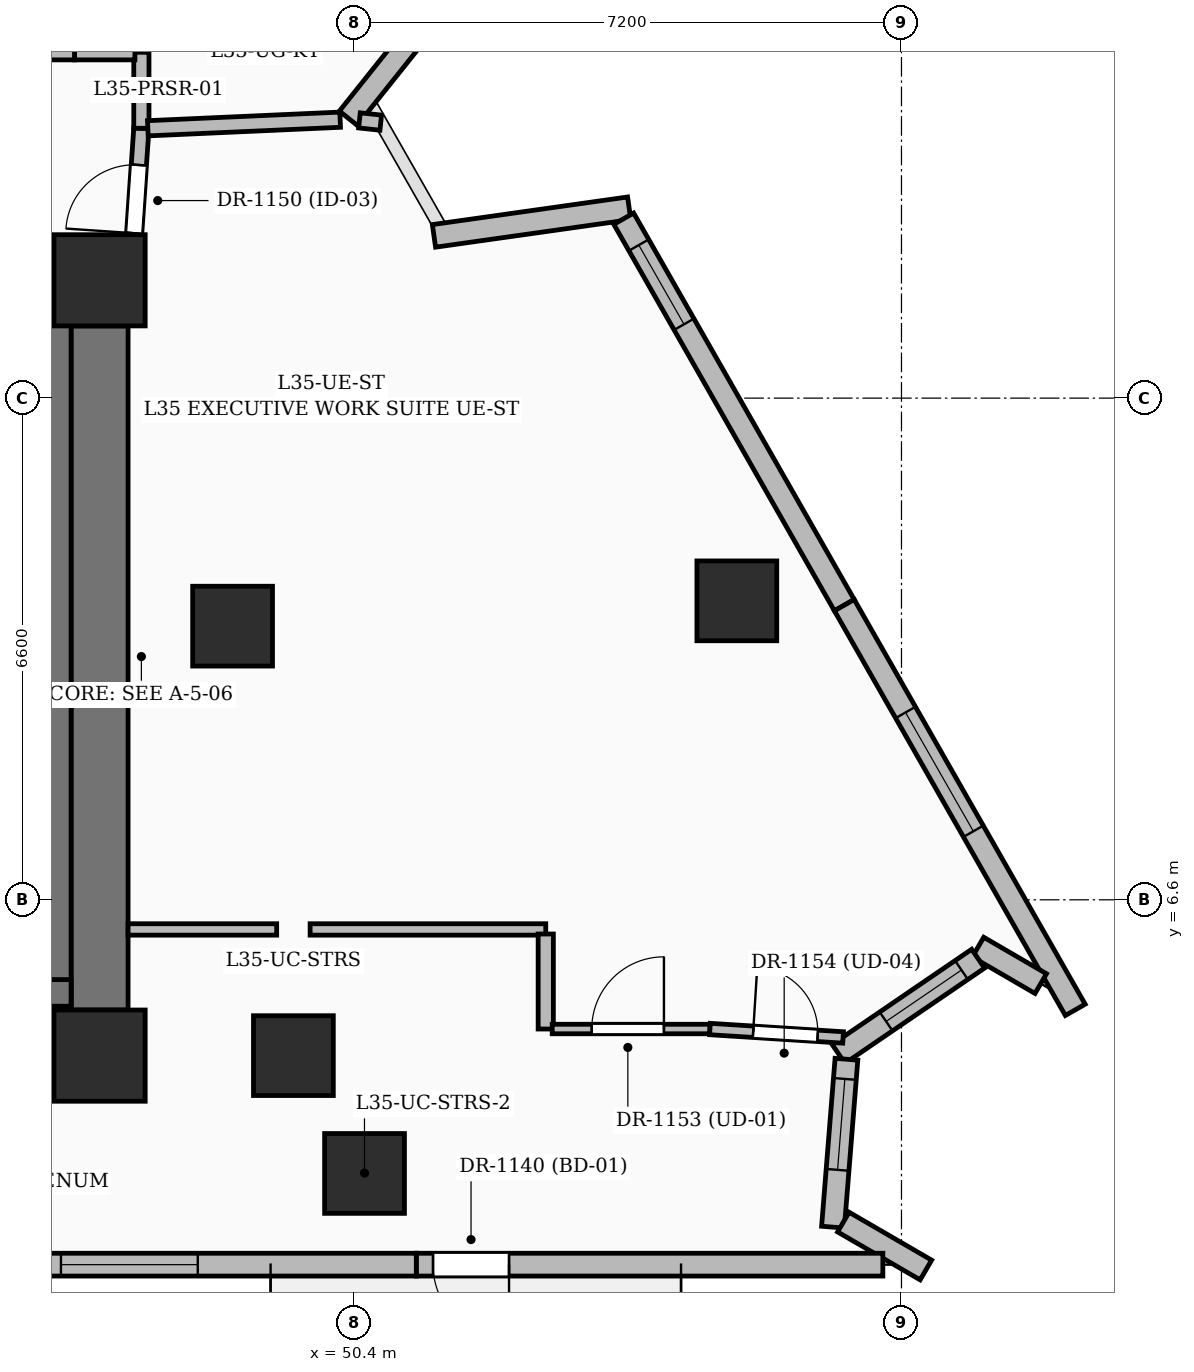
"""IFC4 building model, lengths in metres.
Left out: names, types, materials, properties, quantities, classifications, styles, units other than length and angle.
Written with IfcOpenShell. Run it as: python <this file> out.ifc"""

import sys

from ifc_helpers import new_model, si_unit, direction, frame, frame_2d, origin, origin_2d, place, context, subcontext, project, spatial, rectangle, extrude, element, fill, save


model = new_model("IFC4")
c1 = context("Model", 3, precision=1e-05, world=origin(), true_north=direction((0.0, 1.0)))
c2 = subcontext(c1, "Body", "Model", "MODEL_VIEW")
j1 = project(units=[si_unit("LENGTHUNIT", "METRE"), si_unit("PLANEANGLEUNIT", "RADIAN")], contexts=[c1])
p1 = place(None, origin())
s1 = spatial("IfcSite", under=j1, at=p1, CompositionType="ELEMENT")
p2 = place(p1, origin())
s2 = spatial("IfcBuilding", under=s1, at=p2, CompositionType="ELEMENT")
p3 = place(p2, frame((0.0, 0.0, 139.2)))
s3 = spatial("IfcBuildingStorey", under=s2, at=p3, CompositionType="ELEMENT", Elevation=139.2)
for number, where, z_axis, x_axis in (
    (1, (47.05, 4.55, 0.0), (0.0, 0.0, 1.0), (1.0, 0.0, 0.0)),
    (2, (47.05, 14.75, 0.0), (0.0, 0.0, 1.0), (1.0, 0.0, 0.0)),
):
    element("IfcColumn", number, at=place(p3, frame(where, z_axis=z_axis, x_axis=x_axis)), inside=s3, PredefinedType="COLUMN", context=c2, shape_type="SweptSolid", body=[
        extrude(rectangle(XDim=1.2, YDim=1.2, at=origin_2d()), origin(), (0.0, 0.0, 1.0), 3.6),
    ])
for number, where, z_axis, x_axis in (
    (3, (49.6, 4.55, 0.0), (0.0, 0.0, 1.0), (1.0, 0.0, 0.0)),
    (4, (48.8, 10.2, 0.0), (0.0, 0.0, 1.0), (1.0, 0.0, 0.0)),
):
    element("IfcColumn", number, at=place(p3, frame(where, z_axis=z_axis, x_axis=x_axis)), inside=s3, PredefinedType="COLUMN", context=c2, shape_type="SweptSolid", body=[
        extrude(rectangle(XDim=1.05, YDim=1.05, at=origin_2d()), origin(), (0.0, 0.0, 1.0), 3.6),
    ])
p4 = place(p3, frame((35.75, 4.55, 0.0), z_axis=(0.0, 0.0, 1.0), x_axis=(1.0, 0.0, 0.0)))
e5 = element("IfcWall", 5, at=p4, inside=s3, PredefinedType="SHEAR", context=c2, shape_type="SweptSolid", body=[
    extrude(rectangle(XDim=10.7, YDim=0.75, at=frame_2d((5.35, 0.0))), origin(), (0.0, 0.0, 1.0), 3.6),
])
p5 = place(p3, frame((35.75, 14.75, 0.0), z_axis=(0.0, 0.0, 1.0), x_axis=(1.0, 0.0, 0.0)))
e6 = element("IfcWall", 6, at=p5, inside=s3, PredefinedType="SHEAR", context=c2, shape_type="SweptSolid", body=[
    extrude(rectangle(XDim=10.7, YDim=0.75, at=frame_2d((5.35, 0.0))), origin(), (0.0, 0.0, 1.0), 3.6),
])
p6 = place(p5, frame((1.025, 0.0, 0.0)))
e7 = element("IfcOpeningElement", 7, at=p6, cuts=e6, PredefinedType="OPENING", context=c2, shape_type="SweptSolid", body=[
    extrude(rectangle(XDim=1.05, YDim=2.15, at=frame_2d((0.525, 1.075))), frame((0.0, 0.385, 0.0), z_axis=(0.0, -1.0, 0.0), x_axis=(1.0, 0.0, 0.0)), (0.0, 0.0, 1.0), 0.77),
])
p7 = place(p5, frame((8.625, 0.0, 0.0)))
e8 = element("IfcOpeningElement", 8, at=p7, cuts=e6, PredefinedType="OPENING", context=c2, shape_type="SweptSolid", body=[
    extrude(rectangle(XDim=1.05, YDim=2.15, at=frame_2d((0.525, 1.075))), frame((0.0, 0.385, 0.0), z_axis=(0.0, -1.0, 0.0), x_axis=(1.0, 0.0, 0.0)), (0.0, 0.0, 1.0), 0.77),
])
p8 = place(p3, frame((47.05, 5.15, 0.0), z_axis=(0.0, 0.0, 1.0), x_axis=(0.0, 1.0, 0.0)))
e9 = element("IfcWall", 9, at=p8, inside=s3, PredefinedType="SHEAR", context=c2, shape_type="SweptSolid", body=[
    extrude(rectangle(XDim=9.0, YDim=0.75, at=frame_2d((4.5, 0.0))), origin(), (0.0, 0.0, 1.0), 3.6),
])
p9 = place(p3, frame((46.5, 5.2, 0.0), z_axis=(0.0, 0.0, 1.0), x_axis=(0.0, 1.0, 0.0)))
e10 = element("IfcWall", 10, at=p9, inside=s3, PredefinedType="SOLIDWALL", context=c2, shape_type="SweptSolid", body=[
    extrude(rectangle(XDim=9.175, YDim=0.35, at=frame_2d((4.587, 0.0))), origin(), (0.0, 0.0, 1.0), 3.6),
])
p10 = place(p3, frame((43.125, 5.375, 0.0), z_axis=(0.0, 0.0, 1.0), x_axis=(1.0, 0.0, 0.0)))
e11 = element("IfcWall", 11, at=p10, inside=s3, PredefinedType="SOLIDWALL", context=c2, shape_type="SweptSolid", body=[
    extrude(rectangle(XDim=3.55, YDim=0.35, at=frame_2d((1.775, 0.0))), origin(), (0.0, 0.0, 1.0), 3.6),
])
for number, where, z_axis, x_axis in (
    (12, (50.536, 3.0, 0.0), (0.0, 0.0, 1.0), (1.0, 0.0, 0.0)),
    (13, (55.434, 10.533, 0.0), (0.0, 0.0, 1.0), (1.0, 0.0, 0.0)),
):
    element("IfcColumn", number, at=place(p3, frame(where, z_axis=z_axis, x_axis=x_axis)), inside=s3, PredefinedType="COLUMN", context=c2, shape_type="SweptSolid", body=[
        extrude(rectangle(XDim=1.05, YDim=1.05, at=origin_2d()), origin(), (0.0, 0.0, 1.0), 3.6),
    ])
p11 = place(p3, frame((51.909, 18.869, 0.0), z_axis=(0.0, 0.0, 1.0), x_axis=(-0.624062389724, -0.781374515666, 0.0)))
e14 = element("IfcWall", 14, at=p11, inside=s3, PredefinedType="SOLIDWALL", context=c2, shape_type="SweptSolid", body=[
    extrude(rectangle(XDim=2.542, YDim=0.3, at=frame_2d((1.271, 0.0))), origin(), (0.0, 0.0, 1.0), 2.575),
])
p12 = place(p3, frame((51.449, 15.334, 0.0), z_axis=(0.0, 0.0, 1.0), x_axis=(0.990155518745, 0.139971599617, 0.0)))
e15 = element("IfcWall", 15, at=p12, inside=s3, PredefinedType="SOLIDWALL", context=c2, shape_type="SweptSolid", body=[
    extrude(rectangle(XDim=2.594, YDim=0.3, at=frame_2d((1.297, 0.0))), origin(), (0.0, 0.0, 1.0), 2.575),
])
p13 = place(p3, frame((53.946, 15.561, 0.0), z_axis=(0.0, 0.0, 1.0), x_axis=(0.495694281434, -0.868497080797, 0.0)))
e16 = element("IfcWall", 16, at=p13, inside=s3, PredefinedType="SOLIDWALL", context=c2, shape_type="SweptSolid", body=[
    extrude(rectangle(XDim=5.855, YDim=0.3, at=frame_2d((2.927, 0.0))), origin(), (0.0, 0.0, 1.0), 3.35),
])
p14 = place(p13, frame((0.4, 0.0, 0.8)))
e17 = element("IfcOpeningElement", 17, at=p14, cuts=e16, PredefinedType="OPENING", context=c2, shape_type="SweptSolid", body=[
    extrude(rectangle(XDim=1.2, YDim=1.8, at=frame_2d((0.6, 0.9))), frame((0.0, 0.16, 0.0), z_axis=(0.0, -1.0, 0.0), x_axis=(1.0, 0.0, 0.0)), (0.0, 0.0, 1.0), 0.32),
])
p15 = place(p3, frame((56.848, 10.476, 0.0), z_axis=(0.0, 0.0, 1.0), x_axis=(0.495701378265, -0.868493030246, 0.0)))
e18 = element("IfcWall", 18, at=p15, inside=s3, PredefinedType="SOLIDWALL", context=c2, shape_type="SweptSolid", body=[
    extrude(rectangle(XDim=6.13, YDim=0.3, at=frame_2d((3.065, 0.0))), origin(), (0.0, 0.0, 1.0), 3.35),
])
p16 = place(p15, frame((1.625, 0.0, 0.6)))
e19 = element("IfcOpeningElement", 19, at=p16, cuts=e18, PredefinedType="OPENING", context=c2, shape_type="SweptSolid", body=[
    extrude(rectangle(XDim=1.8, YDim=2.1, at=frame_2d((0.9, 1.05))), frame((0.0, 0.16, 0.0), z_axis=(0.0, -1.0, 0.0), x_axis=(1.0, 0.0, 0.0)), (0.0, 0.0, 1.0), 0.32),
])
p17 = place(p3, frame((59.432, 5.498, 0.0), z_axis=(0.0, 0.0, 1.0), x_axis=(-0.864584698218, 0.502487113871, 0.0)))
e20 = element("IfcWall", 20, at=p17, inside=s3, PredefinedType="SOLIDWALL", context=c2, shape_type="SweptSolid", body=[
    extrude(rectangle(XDim=0.955, YDim=0.3, at=frame_2d((0.478, 0.0))), origin(), (0.0, 0.0, 1.0), 3.35),
])
p18 = place(p3, frame((58.608, 5.825, 0.0), z_axis=(0.0, 0.0, 1.0), x_axis=(-0.8261738865, -0.563415219234, 0.0)))
e21 = element("IfcWall", 21, at=p18, inside=s3, PredefinedType="SOLIDWALL", context=c2, shape_type="SweptSolid", body=[
    extrude(rectangle(XDim=2.222, YDim=0.3, at=frame_2d((1.111, 0.0))), origin(), (0.0, 0.0, 1.0), 3.35),
])
p19 = place(p18, frame((0.265, 0.0, 0.8)))
e22 = element("IfcOpeningElement", 22, at=p19, cuts=e21, PredefinedType="OPENING", context=c2, shape_type="SweptSolid", body=[
    extrude(rectangle(XDim=1.2, YDim=1.8, at=frame_2d((0.6, 0.9))), frame((0.0, 0.16, 0.0), z_axis=(0.0, -1.0, 0.0), x_axis=(1.0, 0.0, 0.0)), (0.0, 0.0, 1.0), 0.32),
])
p20 = place(p3, frame((56.876, 4.502, 0.0), z_axis=(0.0, 0.0, 1.0), x_axis=(-0.079981668757, -0.996796334595, 0.0)))
e23 = element("IfcWall", 23, at=p20, inside=s3, PredefinedType="SOLIDWALL", context=c2, shape_type="SweptSolid", body=[
    extrude(rectangle(XDim=2.216, YDim=0.3, at=frame_2d((1.108, 0.0))), origin(), (0.0, 0.0, 1.0), 3.35),
])
p21 = place(p20, frame((0.26, 0.0, 0.8)))
e24 = element("IfcOpeningElement", 24, at=p21, cuts=e23, PredefinedType="OPENING", context=c2, shape_type="SweptSolid", body=[
    extrude(rectangle(XDim=1.2, YDim=1.8, at=frame_2d((0.6, 0.9))), frame((0.0, 0.16, 0.0), z_axis=(0.0, -1.0, 0.0), x_axis=(1.0, 0.0, 0.0)), (0.0, 0.0, 1.0), 0.32),
])
p22 = place(p3, frame((56.835, 2.36, 0.0), z_axis=(0.0, 0.0, 1.0), x_axis=(0.864799842676, -0.502116751471, 0.0)))
e25 = element("IfcWall", 25, at=p22, inside=s3, PredefinedType="SOLIDWALL", context=c2, shape_type="SweptSolid", body=[
    extrude(rectangle(XDim=1.255, YDim=0.3, at=frame_2d((0.628, 0.0))), origin(), (0.0, 0.0, 1.0), 3.35),
])
p23 = place(p3, frame((57.355, 1.8, 0.0), z_axis=(0.0, 0.0, 1.0), x_axis=(-1.0, 0.0, 0.0)))
e26 = element("IfcWall", 26, at=p23, inside=s3, PredefinedType="SOLIDWALL", context=c2, shape_type="SweptSolid", body=[
    extrude(rectangle(XDim=6.138, YDim=0.3, at=frame_2d((3.069, 0.0))), origin(), (0.0, 0.0, 1.0), 3.35),
])
p24 = place(p23, frame((4.918, 0.0, 0.0)))
e27 = element("IfcOpeningElement", 27, at=p24, cuts=e26, PredefinedType="OPENING", context=c2, shape_type="SweptSolid", body=[
    extrude(rectangle(XDim=1.0, YDim=2.2, at=frame_2d((0.5, 1.1))), frame((0.0, 0.16, 0.0), z_axis=(0.0, -1.0, 0.0), x_axis=(1.0, 0.0, 0.0)), (0.0, 0.0, 1.0), 0.32),
])
p25 = place(p3, frame((51.217, 1.8, 0.0), z_axis=(0.0, 0.0, 1.0), x_axis=(-1.0, 0.0, 0.0)))
e28 = element("IfcWall", 28, at=p25, inside=s3, PredefinedType="SOLIDWALL", context=c2, shape_type="SweptSolid", body=[
    extrude(rectangle(XDim=6.723, YDim=0.3, at=frame_2d((3.362, 0.0))), origin(), (0.0, 0.0, 1.0), 3.35),
])
p26 = place(p25, frame((2.875, 0.0, 0.6)))
e29 = element("IfcOpeningElement", 29, at=p26, cuts=e28, PredefinedType="OPENING", context=c2, shape_type="SweptSolid", body=[
    extrude(rectangle(XDim=1.8, YDim=2.1, at=frame_2d((0.9, 1.05))), frame((0.0, 0.16, 0.0), z_axis=(0.0, -1.0, 0.0), x_axis=(1.0, 0.0, 0.0)), (0.0, 0.0, 1.0), 0.32),
])
p27 = place(p3, frame((47.425, 14.2, 0.0), z_axis=(0.0, 0.0, 1.0), x_axis=(0.068484119878, 0.997652206595, 0.0)))
e30 = element("IfcWall", 30, at=p27, inside=s3, PredefinedType="PARTITIONING", context=c2, shape_type="SweptSolid", body=[
    extrude(rectangle(XDim=2.556, YDim=0.2, at=frame_2d((1.278, 0.0))), origin(), (0.0, 0.0, 1.0), 2.393),
])
p28 = place(p27, frame((1.172, 0.0, 0.0)))
e31 = element("IfcOpeningElement", 31, at=p28, cuts=e30, PredefinedType="OPENING", context=c2, shape_type="SweptSolid", body=[
    extrude(rectangle(XDim=0.9, YDim=2.1, at=frame_2d((0.45, 1.05))), frame((0.0, 0.11, 0.0), z_axis=(0.0, -1.0, 0.0), x_axis=(1.0, 0.0, 0.0)), (0.0, 0.0, 1.0), 0.22),
])
p29 = place(p3, frame((47.6, 16.75, 0.0), z_axis=(0.0, 0.0, 1.0), x_axis=(0.0, 1.0, 0.0)))
e32 = element("IfcWall", 32, at=p29, inside=s3, PredefinedType="PARTITIONING", context=c2, shape_type="SweptSolid", body=[
    extrude(rectangle(XDim=1.0, YDim=0.2, at=frame_2d((0.5, 0.0))), origin(), (0.0, 0.0, 1.0), 3.35),
])
p30 = place(p3, frame((47.515, 17.75, 0.0), z_axis=(0.0, 0.0, 1.0), x_axis=(-1.0, 0.0, 0.0)))
e33 = element("IfcWall", 33, at=p30, inside=s3, PredefinedType="PARTITIONING", context=c2, shape_type="SweptSolid", body=[
    extrude(rectangle(XDim=0.795, YDim=0.2, at=frame_2d((0.397, 0.0))), origin(), (0.0, 0.0, 1.0), 3.35),
])
p31 = place(p3, frame((46.72, 17.75, 0.0), z_axis=(0.0, 0.0, 1.0), x_axis=(-1.0, 0.0, 0.0)))
e34 = element("IfcWall", 34, at=p31, inside=s3, PredefinedType="PARTITIONING", context=c2, shape_type="SweptSolid", body=[
    extrude(rectangle(XDim=2.72, YDim=0.2, at=frame_2d((1.36, 0.0))), origin(), (0.0, 0.0, 1.0), 2.436),
])
p32 = place(p3, frame((49.38, 6.21, 0.0), z_axis=(0.0, 0.0, 1.0), x_axis=(-1.0, 0.0, 0.0)))
e35 = element("IfcWall", 35, at=p32, inside=s3, PredefinedType="PARTITIONING", context=c2, shape_type="SweptSolid", body=[
    extrude(rectangle(XDim=1.955, YDim=0.15, at=frame_2d((0.978, 0.0))), origin(), (0.0, 0.0, 1.0), 2.436),
])
p33 = place(p3, frame((52.92, 6.21, 0.0), z_axis=(0.0, 0.0, 1.0), x_axis=(-1.0, 0.0, 0.0)))
e36 = element("IfcWall", 36, at=p33, inside=s3, PredefinedType="PARTITIONING", context=c2, shape_type="SweptSolid", body=[
    extrude(rectangle(XDim=3.1, YDim=0.15, at=frame_2d((1.55, 0.0))), origin(), (0.0, 0.0, 1.0), 2.57),
])
p34 = place(p3, frame((52.92, 4.9, 0.0), z_axis=(0.0, 0.0, 1.0), x_axis=(0.0, 1.0, 0.0)))
e37 = element("IfcWall", 37, at=p34, inside=s3, PredefinedType="PARTITIONING", context=c2, shape_type="SweptSolid", body=[
    extrude(rectangle(XDim=1.25, YDim=0.2, at=frame_2d((0.625, 0.0))), origin(), (0.0, 0.0, 1.0), 2.57),
])
p35 = place(p3, frame((53.005, 4.9, 0.0), z_axis=(0.0, 0.0, 1.0), x_axis=(1.0, 0.0, 0.0)))
e38 = element("IfcWall", 38, at=p35, inside=s3, PredefinedType="PARTITIONING", context=c2, shape_type="SweptSolid", body=[
    extrude(rectangle(XDim=2.075, YDim=0.125, at=frame_2d((1.038, 0.0))), origin(), (0.0, 0.0, 1.0), 3.35),
])
p36 = place(p35, frame((0.52, 0.0, 0.0)))
e39 = element("IfcOpeningElement", 39, at=p36, cuts=e38, PredefinedType="OPENING", context=c2, shape_type="SweptSolid", body=[
    extrude(rectangle(XDim=0.95, YDim=2.2, at=frame_2d((0.475, 1.1))), frame((0.0, 0.072, 0.0), z_axis=(0.0, -1.0, 0.0), x_axis=(1.0, 0.0, 0.0)), (0.0, 0.0, 1.0), 0.145),
])
p37 = place(p3, frame((55.08, 4.9, 0.0), z_axis=(0.0, 0.0, 1.0), x_axis=(0.998004666512, -0.063140206047, 0.0)))
e40 = element("IfcWall", 40, at=p37, inside=s3, PredefinedType="PARTITIONING", context=c2, shape_type="SweptSolid", body=[
    extrude(rectangle(XDim=1.755, YDim=0.15, at=frame_2d((0.878, 0.0))), origin(), (0.0, 0.0, 1.0), 3.35),
])
p38 = place(p37, frame((0.57, 0.0, 0.0)))
e41 = element("IfcOpeningElement", 41, at=p38, cuts=e40, PredefinedType="OPENING", context=c2, shape_type="SweptSolid", body=[
    extrude(rectangle(XDim=0.85, YDim=2.1, at=frame_2d((0.425, 1.05))), frame((0.0, 0.085, 0.0), z_axis=(0.0, -1.0, 0.0), x_axis=(1.0, 0.0, 0.0)), (0.0, 0.0, 1.0), 0.17),
])
p39 = place(p3, frame((50.215, 16.863, 0.0), z_axis=(0.0, 0.0, 1.0), x_axis=(-0.999003421761, -0.04463365669, 0.0)))
e42 = element("IfcWall", 42, at=p39, inside=s3, PredefinedType="PARTITIONING", context=c2, shape_type="SweptSolid", body=[
    extrude(rectangle(XDim=2.532, YDim=0.2, at=frame_2d((1.266, 0.0))), origin(), (0.0, 0.0, 1.0), 2.393),
])
p40 = place(p3, frame((50.749, 16.824, 0.0), z_axis=(0.0, 0.0, 1.0), x_axis=(-0.994299311312, 0.106624947944, 0.0)))
e43 = element("IfcWall", 43, at=p40, inside=s3, PredefinedType="PARTITIONING", context=c2, shape_type="SweptSolid", body=[
    extrude(rectangle(XDim=0.282, YDim=0.2, at=frame_2d((0.141, 0.0))), origin(), (0.0, 0.0, 1.0), 3.35),
])
p41 = place(p14, origin())
e44 = element("IfcWindow", 44, at=p41, inside=s3, PartitioningType="SINGLE_PANEL", PredefinedType="WINDOW", context=c2, shape_type="SweptSolid", body=[
    extrude(rectangle(XDim=1.2, YDim=1.8, at=frame_2d((0.6, 0.9))), frame((0.0, 0.03, 0.0), z_axis=(0.0, -1.0, 0.0), x_axis=(1.0, 0.0, 0.0)), (0.0, 0.0, 1.0), 0.06),
])
fill(e17, e44)
p42 = place(p16, origin())
e45 = element("IfcWindow", 45, at=p42, inside=s3, PartitioningType="SINGLE_PANEL", PredefinedType="WINDOW", context=c2, shape_type="SweptSolid", body=[
    extrude(rectangle(XDim=1.8, YDim=2.1, at=frame_2d((0.9, 1.05))), frame((0.0, 0.03, 0.0), z_axis=(0.0, -1.0, 0.0), x_axis=(1.0, 0.0, 0.0)), (0.0, 0.0, 1.0), 0.06),
])
fill(e19, e45)
p43 = place(p19, origin())
e46 = element("IfcWindow", 46, at=p43, inside=s3, PartitioningType="SINGLE_PANEL", PredefinedType="WINDOW", context=c2, shape_type="SweptSolid", body=[
    extrude(rectangle(XDim=1.2, YDim=1.8, at=frame_2d((0.6, 0.9))), frame((0.0, 0.03, 0.0), z_axis=(0.0, -1.0, 0.0), x_axis=(1.0, 0.0, 0.0)), (0.0, 0.0, 1.0), 0.06),
])
fill(e22, e46)
p44 = place(p21, origin())
e47 = element("IfcWindow", 47, at=p44, inside=s3, PartitioningType="SINGLE_PANEL", PredefinedType="WINDOW", context=c2, shape_type="SweptSolid", body=[
    extrude(rectangle(XDim=1.2, YDim=1.8, at=frame_2d((0.6, 0.9))), frame((0.0, 0.03, 0.0), z_axis=(0.0, -1.0, 0.0), x_axis=(1.0, 0.0, 0.0)), (0.0, 0.0, 1.0), 0.06),
])
fill(e24, e47)
p45 = place(p24, origin())
e48 = element("IfcDoor", 48, at=p45, inside=s3, OperationType="SINGLE_SWING_LEFT", PredefinedType="DOOR", context=c2, shape_type="SweptSolid", body=[
    extrude(rectangle(XDim=1.0, YDim=2.2, at=frame_2d((0.5, 1.1))), frame((0.0, 0.025, 0.0), z_axis=(0.0, -1.0, 0.0), x_axis=(1.0, 0.0, 0.0)), (0.0, 0.0, 1.0), 0.05),
])
fill(e27, e48)
p46 = place(p26, origin())
e49 = element("IfcWindow", 49, at=p46, inside=s3, PartitioningType="SINGLE_PANEL", PredefinedType="WINDOW", context=c2, shape_type="SweptSolid", body=[
    extrude(rectangle(XDim=1.8, YDim=2.1, at=frame_2d((0.9, 1.05))), frame((0.0, 0.03, 0.0), z_axis=(0.0, -1.0, 0.0), x_axis=(1.0, 0.0, 0.0)), (0.0, 0.0, 1.0), 0.06),
])
fill(e29, e49)
p47 = place(p28, origin())
e50 = element("IfcDoor", 50, at=p47, inside=s3, OperationType="SINGLE_SWING_LEFT", PredefinedType="DOOR", context=c2, shape_type="SweptSolid", body=[
    extrude(rectangle(XDim=0.9, YDim=2.1, at=frame_2d((0.45, 1.05))), frame((0.0, 0.025, 0.0), z_axis=(0.0, -1.0, 0.0), x_axis=(1.0, 0.0, 0.0)), (0.0, 0.0, 1.0), 0.05),
])
fill(e31, e50)
p48 = place(p36, origin())
e51 = element("IfcDoor", 51, at=p48, inside=s3, OperationType="SINGLE_SWING_RIGHT", PredefinedType="DOOR", context=c2, shape_type="SweptSolid", body=[
    extrude(rectangle(XDim=0.95, YDim=2.2, at=frame_2d((0.475, 1.1))), frame((0.0, 0.025, 0.0), z_axis=(0.0, -1.0, 0.0), x_axis=(1.0, 0.0, 0.0)), (0.0, 0.0, 1.0), 0.05),
])
fill(e39, e51)
p49 = place(p38, origin())
e52 = element("IfcDoor", 52, at=p49, inside=s3, OperationType="SINGLE_SWING_LEFT", PredefinedType="DOOR", context=c2, shape_type="SweptSolid", body=[
    extrude(rectangle(XDim=0.85, YDim=2.1, at=frame_2d((0.425, 1.05))), frame((0.0, 0.025, 0.0), z_axis=(0.0, -1.0, 0.0), x_axis=(1.0, 0.0, 0.0)), (0.0, 0.0, 1.0), 0.05),
])
fill(e41, e52)
save(model, sys.argv[1])
